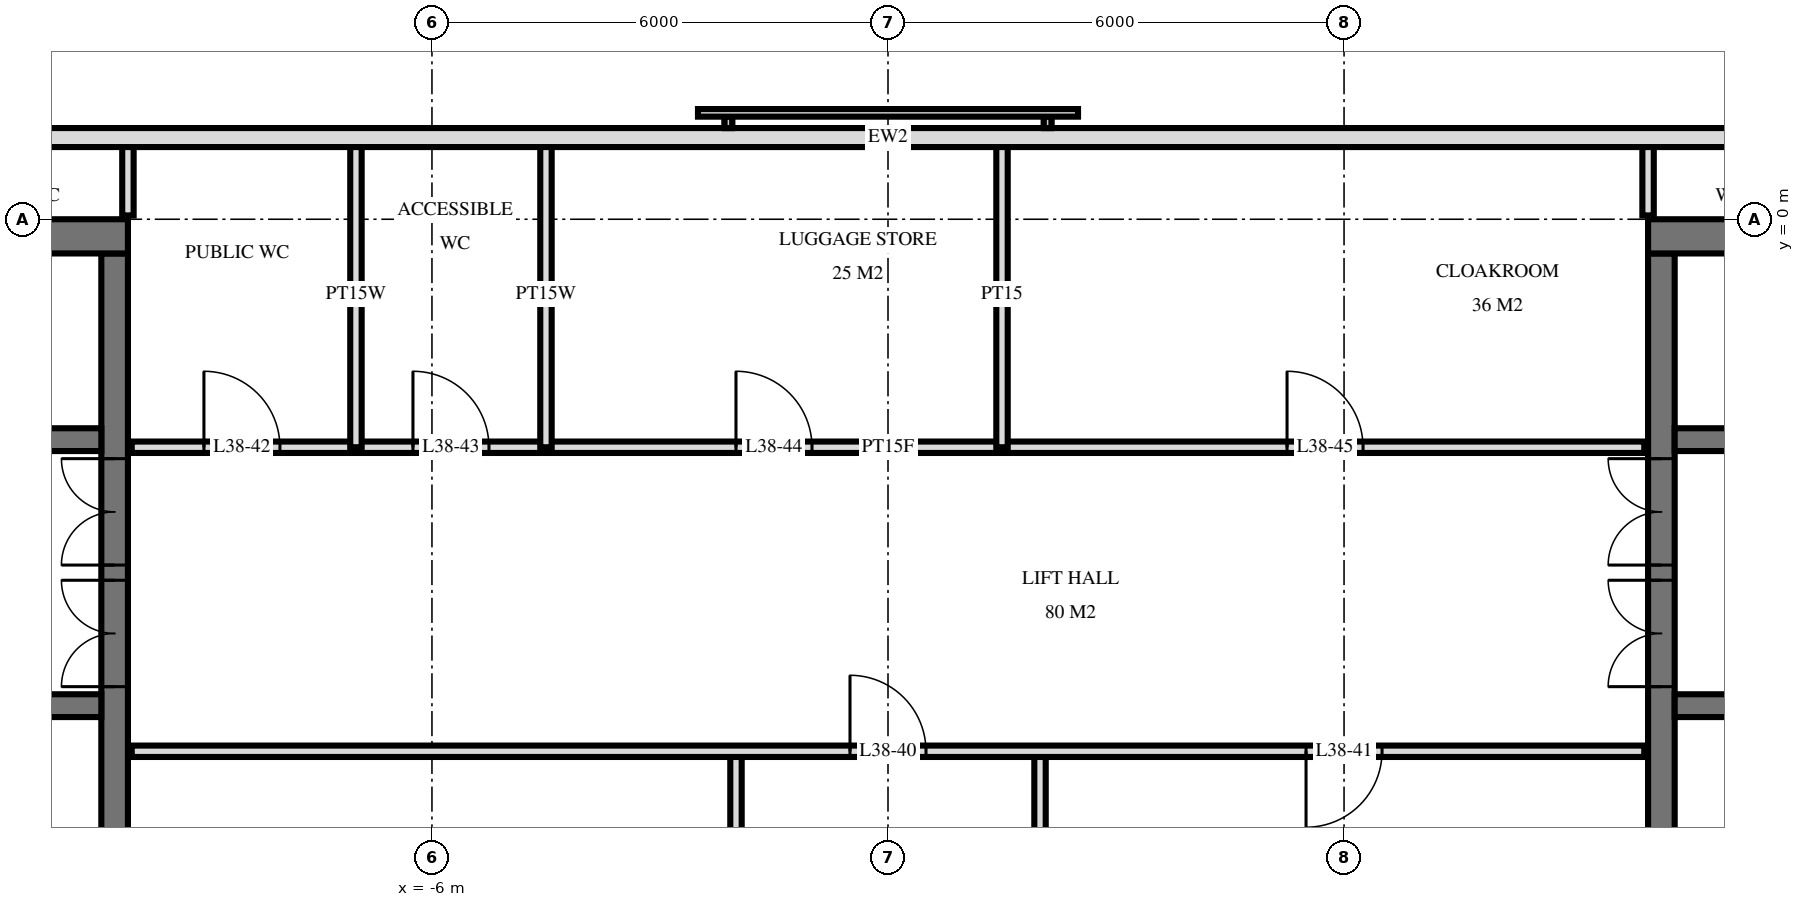
"""IFC4 building model, lengths in metres.
Left out: names, types, materials, properties, quantities, classifications, styles, units other than length and angle.
Written with IfcOpenShell. Run it as: python <this file> out.ifc"""

import sys

from ifc_helpers import new_model, si_unit, direction, frame, frame_2d, origin, place, context, subcontext, project, spatial, rectangle, extrude, element, fill, save


model = new_model("IFC4")
c1 = context("Model", 3, precision=1e-05, world=origin(), true_north=direction((0.0, 1.0)))
c2 = subcontext(c1, "Body", "Model", "MODEL_VIEW")
j1 = project(units=[si_unit("LENGTHUNIT", "METRE"), si_unit("PLANEANGLEUNIT", "RADIAN")], contexts=[c1])
p1 = place(None, origin())
s1 = spatial("IfcSite", under=j1, at=p1, CompositionType="ELEMENT")
p2 = place(p1, origin())
s2 = spatial("IfcBuilding", under=s1, at=p2, CompositionType="ELEMENT")
p3 = place(p2, frame((0.0, 0.0, 148.8)))
s3 = spatial("IfcBuildingStorey", under=s2, at=p3, CompositionType="ELEMENT", Elevation=148.8)
p4 = place(p3, frame((-24.5, -0.225, 0.0), z_axis=(0.0, 0.0, 1.0), x_axis=(1.0, 0.0, 0.0)))
e1 = element("IfcWall", 1, at=p4, inside=s3, PredefinedType="SHEAR", context=c2, shape_type="SweptSolid", body=[
    extrude(rectangle(XDim=14.5, YDim=0.45, at=frame_2d((7.25, 0.0))), origin(), (0.0, 0.0, 1.0), 3.6),
])
p5 = place(p3, frame((-10.175, -14.55, 0.0), z_axis=(0.0, 0.0, 1.0), x_axis=(0.0, 1.0, 0.0)))
e2 = element("IfcWall", 2, at=p5, inside=s3, PredefinedType="SHEAR", context=c2, shape_type="SweptSolid", body=[
    extrude(rectangle(XDim=14.1, YDim=0.35, at=frame_2d((7.05, 0.0))), origin(), (0.0, 0.0, 1.0), 3.6),
])
p6 = place(p5, frame((8.4, 0.0, 0.0)))
e3 = element("IfcOpeningElement", 3, at=p6, cuts=e2, PredefinedType="OPENING", context=c2, shape_type="SweptSolid", body=[
    extrude(rectangle(XDim=1.4, YDim=2.4, at=frame_2d((0.7, 1.2))), frame((0.0, 0.185, 0.0), z_axis=(0.0, -1.0, 0.0), x_axis=(1.0, 0.0, 0.0)), (0.0, 0.0, 1.0), 0.37),
])
p7 = place(p5, frame((10.0, 0.0, 0.0)))
e4 = element("IfcOpeningElement", 4, at=p7, cuts=e2, PredefinedType="OPENING", context=c2, shape_type="SweptSolid", body=[
    extrude(rectangle(XDim=1.4, YDim=2.4, at=frame_2d((0.7, 1.2))), frame((0.0, 0.185, 0.0), z_axis=(0.0, -1.0, 0.0), x_axis=(1.0, 0.0, 0.0)), (0.0, 0.0, 1.0), 0.37),
])
p8 = place(p5, frame((4.0, 0.0, 0.0)))
e5 = element("IfcOpeningElement", 5, at=p8, cuts=e2, PredefinedType="OPENING", context=c2, shape_type="SweptSolid", body=[
    extrude(rectangle(XDim=1.2, YDim=2.1, at=frame_2d((0.6, 1.05))), frame((0.0, 0.185, 0.0), z_axis=(0.0, -1.0, 0.0), x_axis=(1.0, 0.0, 0.0)), (0.0, 0.0, 1.0), 0.37),
])
p9 = place(p3, frame((-24.05, -2.9, 0.0), z_axis=(0.0, 0.0, 1.0), x_axis=(1.0, 0.0, 0.0)))
e6 = element("IfcWall", 6, at=p9, inside=s3, PredefinedType="SHEAR", context=c2, shape_type="SweptSolid", body=[
    extrude(rectangle(XDim=13.7, YDim=0.3, at=frame_2d((6.85, 0.0))), origin(), (0.0, 0.0, 1.0), 3.6),
])
p10 = place(p9, frame((0.55, 0.0, 0.0)))
e7 = element("IfcOpeningElement", 7, at=p10, cuts=e6, PredefinedType="OPENING", context=c2, shape_type="SweptSolid", body=[
    extrude(rectangle(XDim=1.1, YDim=2.1, at=frame_2d((0.55, 1.05))), frame((0.0, 0.16, 0.0), z_axis=(0.0, -1.0, 0.0), x_axis=(1.0, 0.0, 0.0)), (0.0, 0.0, 1.0), 0.32),
])
p11 = place(p9, frame((5.9, 0.0, 0.0)))
e8 = element("IfcOpeningElement", 8, at=p11, cuts=e6, PredefinedType="OPENING", context=c2, shape_type="SweptSolid", body=[
    extrude(rectangle(XDim=0.9, YDim=2.1, at=frame_2d((0.45, 1.05))), frame((0.0, 0.16, 0.0), z_axis=(0.0, -1.0, 0.0), x_axis=(1.0, 0.0, 0.0)), (0.0, 0.0, 1.0), 0.32),
])
p12 = place(p9, frame((11.85, 0.0, 0.0)))
e9 = element("IfcOpeningElement", 9, at=p12, cuts=e6, PredefinedType="OPENING", context=c2, shape_type="SweptSolid", body=[
    extrude(rectangle(XDim=1.0, YDim=2.1, at=frame_2d((0.5, 1.05))), frame((0.0, 0.16, 0.0), z_axis=(0.0, -1.0, 0.0), x_axis=(1.0, 0.0, 0.0)), (0.0, 0.0, 1.0), 0.32),
])
p13 = place(p9, frame((8.85, 0.0, 0.0)))
e10 = element("IfcOpeningElement", 10, at=p13, cuts=e6, PredefinedType="OPENING", context=c2, shape_type="SweptSolid", body=[
    extrude(rectangle(XDim=1.0, YDim=2.1, at=frame_2d((0.5, 1.05))), frame((0.0, 0.16, 0.0), z_axis=(0.0, -1.0, 0.0), x_axis=(1.0, 0.0, 0.0)), (0.0, 0.0, 1.0), 0.32),
])
p14 = place(p9, frame((3.0, 0.0, 0.0)))
e11 = element("IfcOpeningElement", 11, at=p14, cuts=e6, PredefinedType="OPENING", context=c2, shape_type="SweptSolid", body=[
    extrude(rectangle(XDim=1.0, YDim=2.1, at=frame_2d((0.5, 1.05))), frame((0.0, 0.16, 0.0), z_axis=(0.0, -1.0, 0.0), x_axis=(1.0, 0.0, 0.0)), (0.0, 0.0, 1.0), 0.32),
])
p15 = place(p3, frame((-24.05, -6.4, 0.0), z_axis=(0.0, 0.0, 1.0), x_axis=(1.0, 0.0, 0.0)))
e12 = element("IfcWall", 12, at=p15, inside=s3, PredefinedType="SHEAR", context=c2, shape_type="SweptSolid", body=[
    extrude(rectangle(XDim=13.7, YDim=0.3, at=frame_2d((6.85, 0.0))), origin(), (0.0, 0.0, 1.0), 3.6),
])
p16 = place(p15, frame((0.55, 0.0, 0.0)))
e13 = element("IfcOpeningElement", 13, at=p16, cuts=e12, PredefinedType="OPENING", context=c2, shape_type="SweptSolid", body=[
    extrude(rectangle(XDim=1.1, YDim=2.1, at=frame_2d((0.55, 1.05))), frame((0.0, 0.16, 0.0), z_axis=(0.0, -1.0, 0.0), x_axis=(1.0, 0.0, 0.0)), (0.0, 0.0, 1.0), 0.32),
])
p17 = place(p15, frame((5.8, 0.0, 0.0)))
e14 = element("IfcOpeningElement", 14, at=p17, cuts=e12, PredefinedType="OPENING", context=c2, shape_type="SweptSolid", body=[
    extrude(rectangle(XDim=1.1, YDim=2.1, at=frame_2d((0.55, 1.05))), frame((0.0, 0.16, 0.0), z_axis=(0.0, -1.0, 0.0), x_axis=(1.0, 0.0, 0.0)), (0.0, 0.0, 1.0), 0.32),
])
p18 = place(p3, frame((10.0, -0.225, 0.0), z_axis=(0.0, 0.0, 1.0), x_axis=(1.0, 0.0, 0.0)))
e15 = element("IfcWall", 15, at=p18, inside=s3, PredefinedType="SHEAR", context=c2, shape_type="SweptSolid", body=[
    extrude(rectangle(XDim=14.5, YDim=0.45, at=frame_2d((7.25, 0.0))), origin(), (0.0, 0.0, 1.0), 3.6),
])
p19 = place(p3, frame((10.175, -14.55, 0.0), z_axis=(0.0, 0.0, 1.0), x_axis=(0.0, 1.0, 0.0)))
e16 = element("IfcWall", 16, at=p19, inside=s3, PredefinedType="SHEAR", context=c2, shape_type="SweptSolid", body=[
    extrude(rectangle(XDim=14.1, YDim=0.35, at=frame_2d((7.05, 0.0))), origin(), (0.0, 0.0, 1.0), 3.6),
])
p20 = place(p19, frame((8.4, 0.0, 0.0)))
e17 = element("IfcOpeningElement", 17, at=p20, cuts=e16, PredefinedType="OPENING", context=c2, shape_type="SweptSolid", body=[
    extrude(rectangle(XDim=1.4, YDim=2.4, at=frame_2d((0.7, 1.2))), frame((0.0, 0.185, 0.0), z_axis=(0.0, -1.0, 0.0), x_axis=(1.0, 0.0, 0.0)), (0.0, 0.0, 1.0), 0.37),
])
p21 = place(p19, frame((10.0, 0.0, 0.0)))
e18 = element("IfcOpeningElement", 18, at=p21, cuts=e16, PredefinedType="OPENING", context=c2, shape_type="SweptSolid", body=[
    extrude(rectangle(XDim=1.4, YDim=2.4, at=frame_2d((0.7, 1.2))), frame((0.0, 0.185, 0.0), z_axis=(0.0, -1.0, 0.0), x_axis=(1.0, 0.0, 0.0)), (0.0, 0.0, 1.0), 0.37),
])
p22 = place(p19, frame((4.0, 0.0, 0.0)))
e19 = element("IfcOpeningElement", 19, at=p22, cuts=e16, PredefinedType="OPENING", context=c2, shape_type="SweptSolid", body=[
    extrude(rectangle(XDim=1.2, YDim=2.1, at=frame_2d((0.6, 1.05))), frame((0.0, 0.185, 0.0), z_axis=(0.0, -1.0, 0.0), x_axis=(1.0, 0.0, 0.0)), (0.0, 0.0, 1.0), 0.37),
])
p23 = place(p3, frame((10.35, -2.9, 0.0), z_axis=(0.0, 0.0, 1.0), x_axis=(1.0, 0.0, 0.0)))
e20 = element("IfcWall", 20, at=p23, inside=s3, PredefinedType="SHEAR", context=c2, shape_type="SweptSolid", body=[
    extrude(rectangle(XDim=13.7, YDim=0.3, at=frame_2d((6.85, 0.0))), origin(), (0.0, 0.0, 1.0), 3.6),
])
p24 = place(p23, frame((12.05, 0.0, 0.0)))
e21 = element("IfcOpeningElement", 21, at=p24, cuts=e20, PredefinedType="OPENING", context=c2, shape_type="SweptSolid", body=[
    extrude(rectangle(XDim=1.1, YDim=2.1, at=frame_2d((0.55, 1.05))), frame((0.0, 0.16, 0.0), z_axis=(0.0, -1.0, 0.0), x_axis=(1.0, 0.0, 0.0)), (0.0, 0.0, 1.0), 0.32),
])
p25 = place(p23, frame((6.9, 0.0, 0.0)))
e22 = element("IfcOpeningElement", 22, at=p25, cuts=e20, PredefinedType="OPENING", context=c2, shape_type="SweptSolid", body=[
    extrude(rectangle(XDim=0.9, YDim=2.1, at=frame_2d((0.45, 1.05))), frame((0.0, 0.16, 0.0), z_axis=(0.0, -1.0, 0.0), x_axis=(1.0, 0.0, 0.0)), (0.0, 0.0, 1.0), 0.32),
])
p26 = place(p23, frame((0.85, 0.0, 0.0)))
e23 = element("IfcOpeningElement", 23, at=p26, cuts=e20, PredefinedType="OPENING", context=c2, shape_type="SweptSolid", body=[
    extrude(rectangle(XDim=1.0, YDim=2.1, at=frame_2d((0.5, 1.05))), frame((0.0, 0.16, 0.0), z_axis=(0.0, -1.0, 0.0), x_axis=(1.0, 0.0, 0.0)), (0.0, 0.0, 1.0), 0.32),
])
p27 = place(p23, frame((3.85, 0.0, 0.0)))
e24 = element("IfcOpeningElement", 24, at=p27, cuts=e20, PredefinedType="OPENING", context=c2, shape_type="SweptSolid", body=[
    extrude(rectangle(XDim=1.0, YDim=2.1, at=frame_2d((0.5, 1.05))), frame((0.0, 0.16, 0.0), z_axis=(0.0, -1.0, 0.0), x_axis=(1.0, 0.0, 0.0)), (0.0, 0.0, 1.0), 0.32),
])
p28 = place(p23, frame((9.7, 0.0, 0.0)))
e25 = element("IfcOpeningElement", 25, at=p28, cuts=e20, PredefinedType="OPENING", context=c2, shape_type="SweptSolid", body=[
    extrude(rectangle(XDim=1.0, YDim=2.1, at=frame_2d((0.5, 1.05))), frame((0.0, 0.16, 0.0), z_axis=(0.0, -1.0, 0.0), x_axis=(1.0, 0.0, 0.0)), (0.0, 0.0, 1.0), 0.32),
])
p29 = place(p3, frame((10.35, -6.4, 0.0), z_axis=(0.0, 0.0, 1.0), x_axis=(1.0, 0.0, 0.0)))
e26 = element("IfcWall", 26, at=p29, inside=s3, PredefinedType="SHEAR", context=c2, shape_type="SweptSolid", body=[
    extrude(rectangle(XDim=13.7, YDim=0.3, at=frame_2d((6.85, 0.0))), origin(), (0.0, 0.0, 1.0), 3.6),
])
p30 = place(p29, frame((12.05, 0.0, 0.0)))
e27 = element("IfcOpeningElement", 27, at=p30, cuts=e26, PredefinedType="OPENING", context=c2, shape_type="SweptSolid", body=[
    extrude(rectangle(XDim=1.1, YDim=2.1, at=frame_2d((0.55, 1.05))), frame((0.0, 0.16, 0.0), z_axis=(0.0, -1.0, 0.0), x_axis=(1.0, 0.0, 0.0)), (0.0, 0.0, 1.0), 0.32),
])
p31 = place(p29, frame((6.8, 0.0, 0.0)))
e28 = element("IfcOpeningElement", 28, at=p31, cuts=e26, PredefinedType="OPENING", context=c2, shape_type="SweptSolid", body=[
    extrude(rectangle(XDim=1.1, YDim=2.1, at=frame_2d((0.55, 1.05))), frame((0.0, 0.16, 0.0), z_axis=(0.0, -1.0, 0.0), x_axis=(1.0, 0.0, 0.0)), (0.0, 0.0, 1.0), 0.32),
])
p32 = place(p3, frame((23.675, 1.075, 0.0), z_axis=(0.0, 0.0, 1.0), x_axis=(-1.0, 0.0, 0.0)))
e29 = element("IfcWall", 29, at=p32, inside=s3, PredefinedType="SOLIDWALL", context=c2, shape_type="SweptSolid", body=[
    extrude(rectangle(XDim=47.351, YDim=0.25, at=frame_2d((23.675, 0.0))), origin(), (0.0, 0.0, 1.0), 3.32),
])
p33 = place(p3, frame((10.0, 0.05, 0.0), z_axis=(0.0, 0.0, 1.0), x_axis=(0.0, 1.0, 0.0)))
e30 = element("IfcWall", 30, at=p33, inside=s3, PredefinedType="PARTITIONING", context=c2, shape_type="SweptSolid", body=[
    extrude(rectangle(XDim=0.97, YDim=0.15, at=frame_2d((0.485, 0.0))), origin(), (0.0, 0.0, 1.0), 3.32),
])
p34 = place(p3, frame((2.0, -11.0, 0.0), z_axis=(0.0, 0.0, 1.0), x_axis=(0.0, 1.0, 0.0)))
e31 = element("IfcWall", 31, at=p34, inside=s3, PredefinedType="PARTITIONING", context=c2, shape_type="SweptSolid", body=[
    extrude(rectangle(XDim=4.0, YDim=0.15, at=frame_2d((2.0, 0.0))), origin(), (0.0, 0.0, 1.0), 3.32),
])
p35 = place(p3, frame((1.5, -3.0, 0.0), z_axis=(0.0, 0.0, 1.0), x_axis=(0.0, 1.0, 0.0)))
e32 = element("IfcWall", 32, at=p35, inside=s3, PredefinedType="PARTITIONING", context=c2, shape_type="SweptSolid", body=[
    extrude(rectangle(XDim=4.02, YDim=0.15, at=frame_2d((2.01, 0.0))), origin(), (0.0, 0.0, 1.0), 3.32),
])
p36 = place(p3, frame((-2.0, -11.0, 0.0), z_axis=(0.0, 0.0, 1.0), x_axis=(0.0, 1.0, 0.0)))
e33 = element("IfcWall", 33, at=p36, inside=s3, PredefinedType="PARTITIONING", context=c2, shape_type="SweptSolid", body=[
    extrude(rectangle(XDim=4.0, YDim=0.15, at=frame_2d((2.0, 0.0))), origin(), (0.0, 0.0, 1.0), 3.32),
])
for number, where, z_axis, x_axis in (
    (34, (-4.5, -3.0, 0.0), (0.0, 0.0, 1.0), (0.0, 1.0, 0.0)),
    (35, (-7.0, -3.0, 0.0), (0.0, 0.0, 1.0), (0.0, 1.0, 0.0)),
):
    element("IfcWall", number, at=place(p3, frame(where, z_axis=z_axis, x_axis=x_axis)), inside=s3, PredefinedType="PLUMBINGWALL", context=c2, shape_type="SweptSolid", body=[
        extrude(rectangle(XDim=4.02, YDim=0.15, at=frame_2d((2.01, 0.0))), origin(), (0.0, 0.0, 1.0), 3.32),
    ])
p37 = place(p3, frame((-10.0, 0.05, 0.0), z_axis=(0.0, 0.0, 1.0), x_axis=(0.0, 1.0, 0.0)))
e36 = element("IfcWall", 36, at=p37, inside=s3, PredefinedType="PLUMBINGWALL", context=c2, shape_type="SweptSolid", body=[
    extrude(rectangle(XDim=0.97, YDim=0.15, at=frame_2d((0.485, 0.0))), origin(), (0.0, 0.0, 1.0), 3.32),
])
p38 = place(p3, frame((-9.95, -7.0, 0.0), z_axis=(0.0, 0.0, 1.0), x_axis=(1.0, 0.0, 0.0)))
e37 = element("IfcWall", 37, at=p38, inside=s3, PredefinedType="PARTITIONING", context=c2, shape_type="SweptSolid", body=[
    extrude(rectangle(XDim=19.9, YDim=0.15, at=frame_2d((9.95, 0.0))), origin(), (0.0, 0.0, 1.0), 3.32),
])
p39 = place(p38, frame((9.45, 0.0, 0.0)))
e38 = element("IfcOpeningElement", 38, at=p39, cuts=e37, PredefinedType="OPENING", context=c2, shape_type="SweptSolid", body=[
    extrude(rectangle(XDim=1.0, YDim=2.1, at=frame_2d((0.5, 1.05))), frame((0.0, 0.085, 0.0), z_axis=(0.0, -1.0, 0.0), x_axis=(1.0, 0.0, 0.0)), (0.0, 0.0, 1.0), 0.17),
])
p40 = place(p38, frame((15.45, 0.0, 0.0)))
e39 = element("IfcOpeningElement", 39, at=p40, cuts=e37, PredefinedType="OPENING", context=c2, shape_type="SweptSolid", body=[
    extrude(rectangle(XDim=1.0, YDim=2.1, at=frame_2d((0.5, 1.05))), frame((0.0, 0.085, 0.0), z_axis=(0.0, -1.0, 0.0), x_axis=(1.0, 0.0, 0.0)), (0.0, 0.0, 1.0), 0.17),
])
p41 = place(p3, frame((-9.95, -3.0, 0.0), z_axis=(0.0, 0.0, 1.0), x_axis=(1.0, 0.0, 0.0)))
e40 = element("IfcWall", 40, at=p41, inside=s3, PredefinedType="PARTITIONING", context=c2, shape_type="SweptSolid", body=[
    extrude(rectangle(XDim=19.9, YDim=0.15, at=frame_2d((9.95, 0.0))), origin(), (0.0, 0.0, 1.0), 3.32),
])
p42 = place(p41, frame((0.95, 0.0, 0.0)))
e41 = element("IfcOpeningElement", 41, at=p42, cuts=e40, PredefinedType="OPENING", context=c2, shape_type="SweptSolid", body=[
    extrude(rectangle(XDim=1.0, YDim=2.1, at=frame_2d((0.5, 1.05))), frame((0.0, 0.085, 0.0), z_axis=(0.0, -1.0, 0.0), x_axis=(1.0, 0.0, 0.0)), (0.0, 0.0, 1.0), 0.17),
])
p43 = place(p41, frame((3.7, 0.0, 0.0)))
e42 = element("IfcOpeningElement", 42, at=p43, cuts=e40, PredefinedType="OPENING", context=c2, shape_type="SweptSolid", body=[
    extrude(rectangle(XDim=1.0, YDim=2.1, at=frame_2d((0.5, 1.05))), frame((0.0, 0.085, 0.0), z_axis=(0.0, -1.0, 0.0), x_axis=(1.0, 0.0, 0.0)), (0.0, 0.0, 1.0), 0.17),
])
p44 = place(p41, frame((7.95, 0.0, 0.0)))
e43 = element("IfcOpeningElement", 43, at=p44, cuts=e40, PredefinedType="OPENING", context=c2, shape_type="SweptSolid", body=[
    extrude(rectangle(XDim=1.0, YDim=2.1, at=frame_2d((0.5, 1.05))), frame((0.0, 0.085, 0.0), z_axis=(0.0, -1.0, 0.0), x_axis=(1.0, 0.0, 0.0)), (0.0, 0.0, 1.0), 0.17),
])
p45 = place(p41, frame((15.2, 0.0, 0.0)))
e44 = element("IfcOpeningElement", 44, at=p45, cuts=e40, PredefinedType="OPENING", context=c2, shape_type="SweptSolid", body=[
    extrude(rectangle(XDim=1.0, YDim=2.1, at=frame_2d((0.5, 1.05))), frame((0.0, 0.085, 0.0), z_axis=(0.0, -1.0, 0.0), x_axis=(1.0, 0.0, 0.0)), (0.0, 0.0, 1.0), 0.17),
])
p46 = place(p6, origin())
e45 = element("IfcDoor", 45, at=p46, inside=s3, OperationType="DOUBLE_DOOR_SINGLE_SWING", PredefinedType="DOOR", context=c2, shape_type="SweptSolid", body=[
    extrude(rectangle(XDim=1.4, YDim=2.4, at=frame_2d((0.7, 1.2))), frame((0.0, 0.025, 0.0), z_axis=(0.0, -1.0, 0.0), x_axis=(1.0, 0.0, 0.0)), (0.0, 0.0, 1.0), 0.05),
])
fill(e3, e45)
p47 = place(p7, origin())
e46 = element("IfcDoor", 46, at=p47, inside=s3, OperationType="DOUBLE_DOOR_SINGLE_SWING", PredefinedType="DOOR", context=c2, shape_type="SweptSolid", body=[
    extrude(rectangle(XDim=1.4, YDim=2.4, at=frame_2d((0.7, 1.2))), frame((0.0, 0.025, 0.0), z_axis=(0.0, -1.0, 0.0), x_axis=(1.0, 0.0, 0.0)), (0.0, 0.0, 1.0), 0.05),
])
fill(e4, e46)
p48 = place(p20, origin())
e47 = element("IfcDoor", 47, at=p48, inside=s3, OperationType="DOUBLE_DOOR_SINGLE_SWING", PredefinedType="DOOR", context=c2, shape_type="SweptSolid", body=[
    extrude(rectangle(XDim=1.4, YDim=2.4, at=frame_2d((0.7, 1.2))), frame((0.0, 0.025, 0.0), z_axis=(0.0, -1.0, 0.0), x_axis=(1.0, 0.0, 0.0)), (0.0, 0.0, 1.0), 0.05),
])
fill(e17, e47)
p49 = place(p21, origin())
e48 = element("IfcDoor", 48, at=p49, inside=s3, OperationType="DOUBLE_DOOR_SINGLE_SWING", PredefinedType="DOOR", context=c2, shape_type="SweptSolid", body=[
    extrude(rectangle(XDim=1.4, YDim=2.4, at=frame_2d((0.7, 1.2))), frame((0.0, 0.025, 0.0), z_axis=(0.0, -1.0, 0.0), x_axis=(1.0, 0.0, 0.0)), (0.0, 0.0, 1.0), 0.05),
])
fill(e18, e48)
p50 = place(p39, origin())
e49 = element("IfcDoor", 49, at=p50, inside=s3, OperationType="SINGLE_SWING_RIGHT", PredefinedType="DOOR", context=c2, shape_type="SweptSolid", body=[
    extrude(rectangle(XDim=1.0, YDim=2.1, at=frame_2d((0.5, 1.05))), frame((0.0, 0.025, 0.0), z_axis=(0.0, -1.0, 0.0), x_axis=(1.0, 0.0, 0.0)), (0.0, 0.0, 1.0), 0.05),
])
fill(e38, e49)
p51 = place(p40, frame((0.5, 0.0, 0.0), z_axis=(0.0, 0.0, 1.0), x_axis=(-1.0, 0.0, 0.0)))
e50 = element("IfcDoor", 50, at=p51, inside=s3, OperationType="SINGLE_SWING_LEFT", PredefinedType="DOOR", context=c2, shape_type="SweptSolid", body=[
    extrude(rectangle(XDim=1.0, YDim=2.1, at=frame_2d((0.0, 1.05))), frame((0.0, -0.025, 0.0), z_axis=(0.0, 1.0, 0.0), x_axis=(-1.0, 0.0, 0.0)), (0.0, 0.0, 1.0), 0.05),
])
fill(e39, e50)
p52 = place(p42, origin())
e51 = element("IfcDoor", 51, at=p52, inside=s3, OperationType="SINGLE_SWING_RIGHT", PredefinedType="DOOR", context=c2, shape_type="SweptSolid", body=[
    extrude(rectangle(XDim=1.0, YDim=2.1, at=frame_2d((0.5, 1.05))), frame((0.0, 0.025, 0.0), z_axis=(0.0, -1.0, 0.0), x_axis=(1.0, 0.0, 0.0)), (0.0, 0.0, 1.0), 0.05),
])
fill(e41, e51)
p53 = place(p43, origin())
e52 = element("IfcDoor", 52, at=p53, inside=s3, OperationType="SINGLE_SWING_RIGHT", PredefinedType="DOOR", context=c2, shape_type="SweptSolid", body=[
    extrude(rectangle(XDim=1.0, YDim=2.1, at=frame_2d((0.5, 1.05))), frame((0.0, 0.025, 0.0), z_axis=(0.0, -1.0, 0.0), x_axis=(1.0, 0.0, 0.0)), (0.0, 0.0, 1.0), 0.05),
])
fill(e42, e52)
p54 = place(p44, origin())
e53 = element("IfcDoor", 53, at=p54, inside=s3, OperationType="SINGLE_SWING_RIGHT", PredefinedType="DOOR", context=c2, shape_type="SweptSolid", body=[
    extrude(rectangle(XDim=1.0, YDim=2.1, at=frame_2d((0.5, 1.05))), frame((0.0, 0.025, 0.0), z_axis=(0.0, -1.0, 0.0), x_axis=(1.0, 0.0, 0.0)), (0.0, 0.0, 1.0), 0.05),
])
fill(e43, e53)
p55 = place(p45, origin())
e54 = element("IfcDoor", 54, at=p55, inside=s3, OperationType="SINGLE_SWING_RIGHT", PredefinedType="DOOR", context=c2, shape_type="SweptSolid", body=[
    extrude(rectangle(XDim=1.0, YDim=2.1, at=frame_2d((0.5, 1.05))), frame((0.0, 0.025, 0.0), z_axis=(0.0, -1.0, 0.0), x_axis=(1.0, 0.0, 0.0)), (0.0, 0.0, 1.0), 0.05),
])
fill(e44, e54)
save(model, sys.argv[1])
